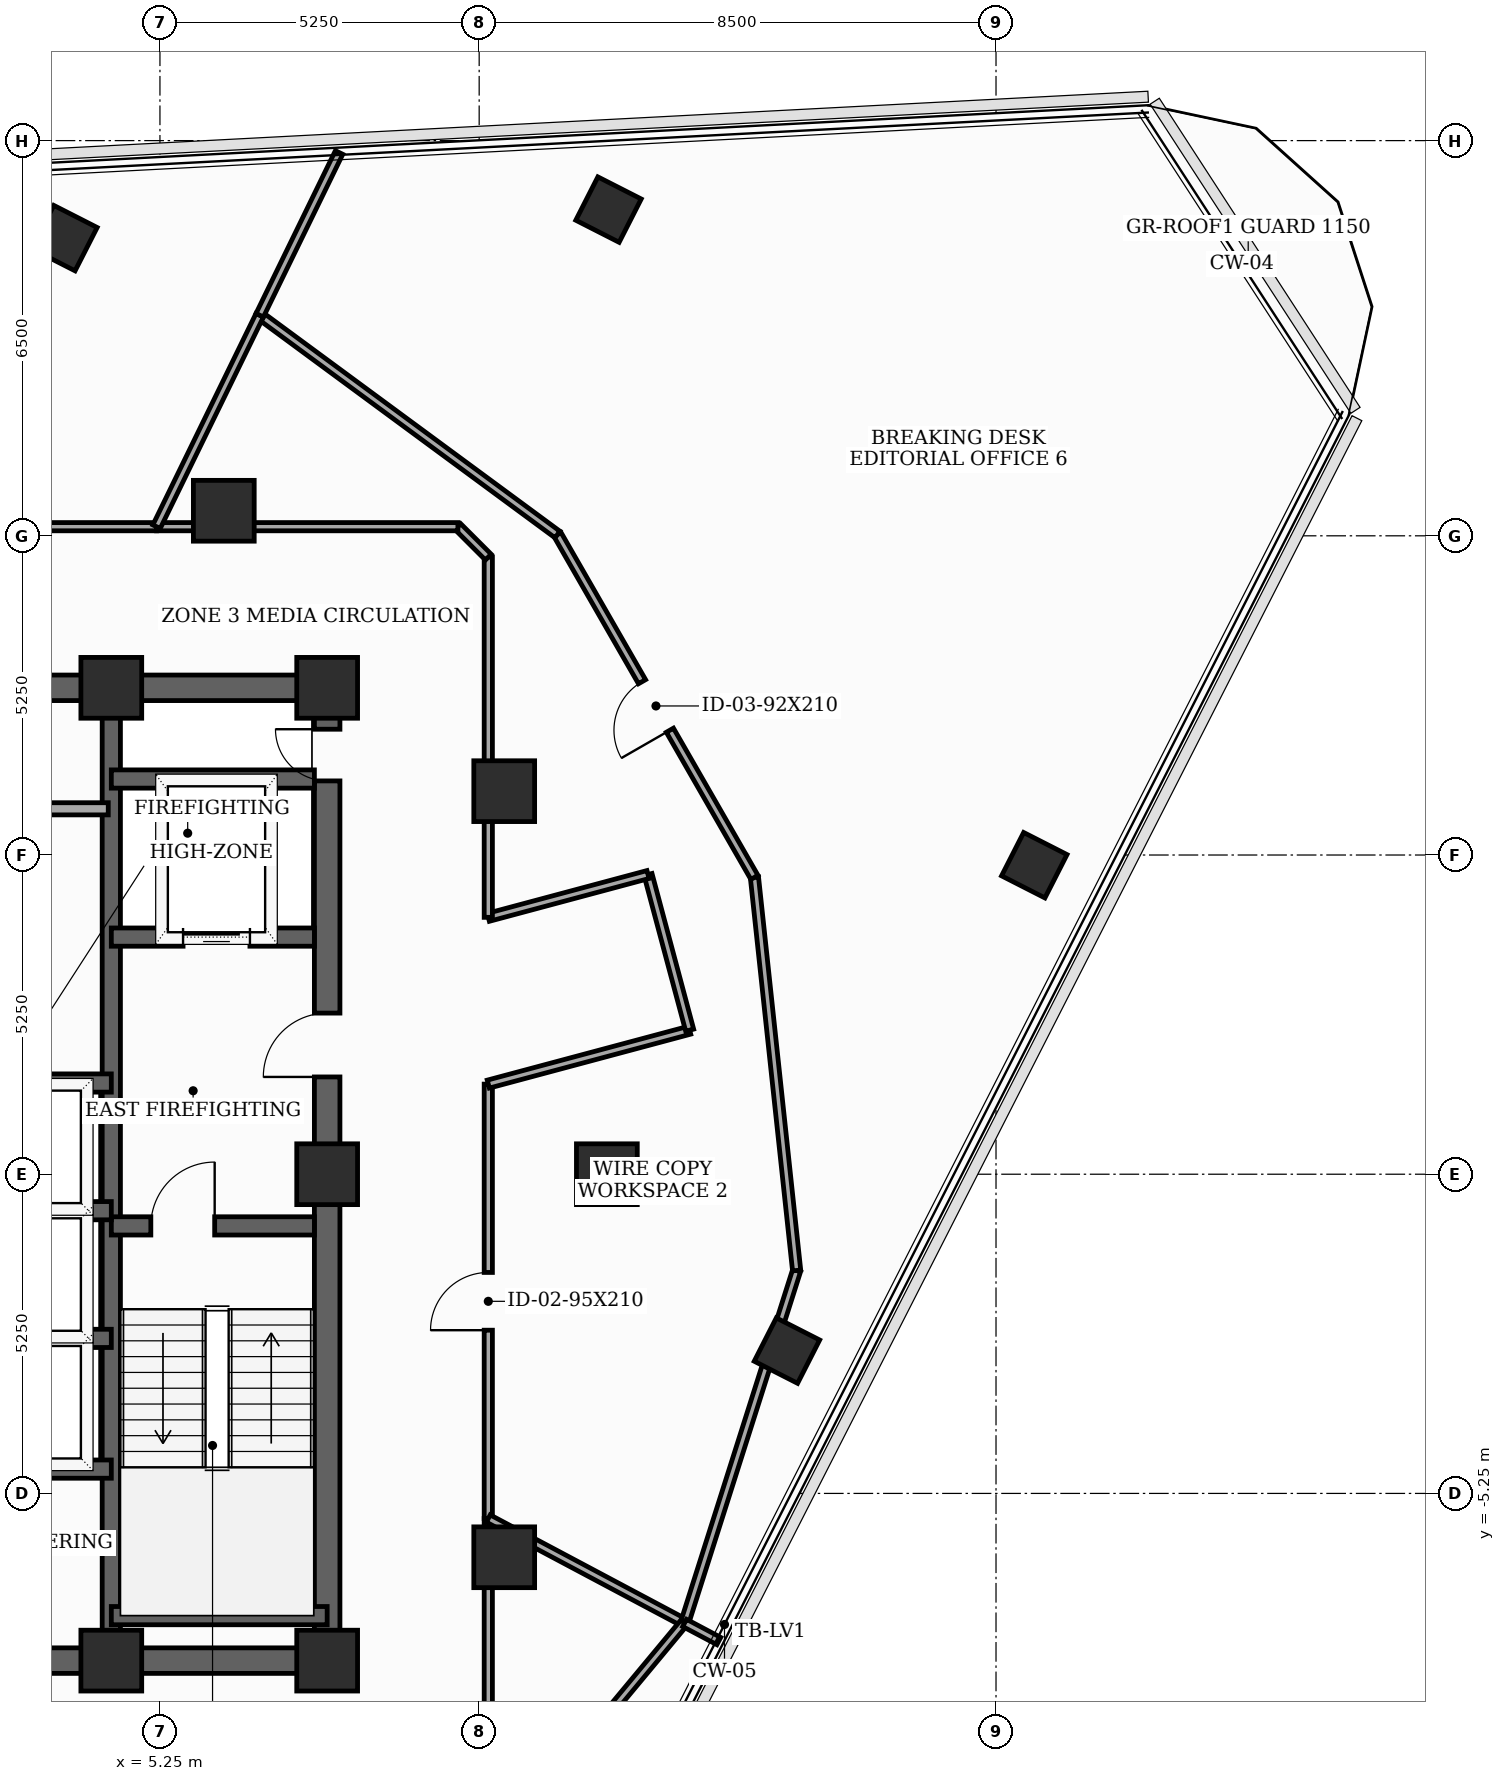
"""IFC4 building model, lengths in metres.
Left out: names, types, materials, properties, quantities, classifications, styles, units other than length and angle.
Written with IfcOpenShell. Run it as: python <this file> out.ifc"""

import sys

from ifc_helpers import new_model, si_unit, direction, frame, frame_2d, origin, origin_2d, place, context, subcontext, project, spatial, rectangle, extrude, element, fill, save


model = new_model("IFC4")
c1 = context("Model", 3, precision=1e-05, world=origin(), true_north=direction((0.0, 1.0)))
c2 = subcontext(c1, "Body", "Model", "MODEL_VIEW")
j1 = project(units=[si_unit("LENGTHUNIT", "METRE"), si_unit("PLANEANGLEUNIT", "RADIAN")], contexts=[c1])
p1 = place(None, origin())
s1 = spatial("IfcSite", under=j1, at=p1, CompositionType="ELEMENT")
p2 = place(p1, origin())
s2 = spatial("IfcBuilding", under=s1, at=p2, CompositionType="ELEMENT")
p3 = place(p2, frame((0.0, 0.0, 263.3)))
s3 = spatial("IfcBuildingStorey", under=s2, at=p3, CompositionType="ELEMENT", Elevation=263.3)
for number, where, z_axis, x_axis in (
    (1, (4.45, -8.0, 0.0), (0.0, 0.0, 1.0), (1.0, 0.0, 0.0)),
    (2, (8.0, -8.0, 0.0), (0.0, 0.0, 1.0), (1.0, 0.0, 0.0)),
    (3, (8.0, 0.0, 0.0), (0.0, 0.0, 1.0), (1.0, 0.0, 0.0)),
    (4, (8.0, 8.0, 0.0), (0.0, 0.0, 1.0), (1.0, 0.0, 0.0)),
    (5, (4.45, 8.0, 0.0), (0.0, 0.0, 1.0), (1.0, 0.0, 0.0)),
    (6, (12.6, 0.0, 0.0), (0.0, 0.0, 1.0), (1.0, 0.0, 0.0)),
    (7, (10.912, 6.3, 0.0), (0.0, 0.0, 1.0), (1.0, 0.0, 0.0)),
    (8, (6.3, 10.912, 0.0), (0.0, 0.0, 1.0), (1.0, 0.0, 0.0)),
    (9, (10.912, -6.3, 0.0), (0.0, 0.0, 1.0), (1.0, 0.0, 0.0)),
):
    element("IfcColumn", number, at=place(p3, frame(where, z_axis=z_axis, x_axis=x_axis)), inside=s3, PredefinedType="COLUMN", context=c2, shape_type="SweptSolid", body=[
        extrude(rectangle(XDim=1.0, YDim=1.0, at=origin_2d()), origin(), (0.0, 0.0, 1.0), 3.7),
    ])
for number, where, z_axis, x_axis in (
    (10, (15.562, -2.901, 0.0), (0.0, 0.0, 1.0), (0.454, 0.891, 0.0)),
    (11, (19.629, 5.082, 0.0), (0.0, 0.0, 1.0), (0.454, 0.891, 0.0)),
    (12, (12.627, 15.865, 0.0), (0.0, 0.0, 1.0), (0.454, 0.891, 0.0)),
    (13, (3.679, 15.396, 0.0), (0.0, 0.0, 1.0), (0.454, 0.891, 0.0)),
):
    element("IfcColumn", number, at=place(p3, frame(where, z_axis=z_axis, x_axis=x_axis)), inside=s3, PredefinedType="COLUMN", context=c2, shape_type="SweptSolid", body=[
        extrude(rectangle(XDim=0.8, YDim=0.8, at=origin_2d()), origin(), (0.0, 0.0, 1.0), 3.7),
    ])
p4 = place(p3, frame((8.0, -8.0, 0.0), z_axis=(0.0, 0.0, 1.0), x_axis=(0.0, 1.0, 0.0)))
e14 = element("IfcWall", 14, at=p4, inside=s3, PredefinedType="SHEAR", context=c2, shape_type="SweptSolid", body=[
    extrude(rectangle(XDim=16.0, YDim=0.42, at=frame_2d((8.0, 0.0))), origin(), (0.0, 0.0, 1.0), 3.5),
])
p5 = place(p4, frame((9.6, 0.0, 0.0)))
e15 = element("IfcOpeningElement", 15, at=p5, cuts=e14, PredefinedType="OPENING", context=c2, shape_type="SweptSolid", body=[
    extrude(rectangle(XDim=1.05, YDim=2.15, at=frame_2d((0.525, 1.075))), frame((0.0, 0.22, 0.0), z_axis=(0.0, -1.0, 0.0), x_axis=(1.0, 0.0, 0.0)), (0.0, 0.0, 1.0), 0.44),
])
p6 = place(p4, frame((14.469, 0.0, 0.0)))
e16 = element("IfcOpeningElement", 16, at=p6, cuts=e14, PredefinedType="OPENING", context=c2, shape_type="SweptSolid", body=[
    extrude(rectangle(XDim=0.85, YDim=2.02, at=frame_2d((0.425, 1.01))), frame((0.0, 0.22, 0.0), z_axis=(0.0, -1.0, 0.0), x_axis=(1.0, 0.0, 0.0)), (0.0, 0.0, 1.0), 0.44),
])
p7 = place(p3, frame((-8.0, -8.0, 0.0), z_axis=(0.0, 0.0, 1.0), x_axis=(1.0, 0.0, 0.0)))
e17 = element("IfcWall", 17, at=p7, inside=s3, PredefinedType="SHEAR", context=c2, shape_type="SweptSolid", body=[
    extrude(rectangle(XDim=16.0, YDim=0.42, at=frame_2d((8.0, 0.0))), origin(), (0.0, 0.0, 1.0), 3.5),
])
p8 = place(p7, frame((4.6, 0.0, 0.0)))
e18 = element("IfcOpeningElement", 18, at=p8, cuts=e17, PredefinedType="OPENING", context=c2, shape_type="SweptSolid", body=[
    extrude(rectangle(XDim=0.95, YDim=2.1, at=frame_2d((0.475, 1.05))), frame((0.0, 0.22, 0.0), z_axis=(0.0, -1.0, 0.0), x_axis=(1.0, 0.0, 0.0)), (0.0, 0.0, 1.0), 0.44),
])
p9 = place(p7, frame((7.52, 0.0, 0.0)))
e19 = element("IfcOpeningElement", 19, at=p9, cuts=e17, PredefinedType="OPENING", context=c2, shape_type="SweptSolid", body=[
    extrude(rectangle(XDim=0.95, YDim=2.1, at=frame_2d((0.475, 1.05))), frame((0.0, 0.22, 0.0), z_axis=(0.0, -1.0, 0.0), x_axis=(1.0, 0.0, 0.0)), (0.0, 0.0, 1.0), 0.44),
])
p10 = place(p7, frame((10.45, 0.0, 0.0)))
e20 = element("IfcOpeningElement", 20, at=p10, cuts=e17, PredefinedType="OPENING", context=c2, shape_type="SweptSolid", body=[
    extrude(rectangle(XDim=0.95, YDim=2.1, at=frame_2d((0.475, 1.05))), frame((0.0, 0.22, 0.0), z_axis=(0.0, -1.0, 0.0), x_axis=(1.0, 0.0, 0.0)), (0.0, 0.0, 1.0), 0.44),
])
p11 = place(p3, frame((-8.0, 8.0, 0.0), z_axis=(0.0, 0.0, 1.0), x_axis=(1.0, 0.0, 0.0)))
e21 = element("IfcWall", 21, at=p11, inside=s3, PredefinedType="SHEAR", context=c2, shape_type="SweptSolid", body=[
    extrude(rectangle(XDim=16.0, YDim=0.42, at=frame_2d((8.0, 0.0))), origin(), (0.0, 0.0, 1.0), 3.5),
])
p12 = place(p11, frame((7.1, 0.0, 0.0)))
e22 = element("IfcOpeningElement", 22, at=p12, cuts=e21, PredefinedType="OPENING", context=c2, shape_type="SweptSolid", body=[
    extrude(rectangle(XDim=1.8, YDim=2.15, at=frame_2d((0.9, 1.075))), frame((0.0, 0.22, 0.0), z_axis=(0.0, -1.0, 0.0), x_axis=(1.0, 0.0, 0.0)), (0.0, 0.0, 1.0), 0.44),
])
p13 = place(p3, frame((4.45, -7.79, 0.0), z_axis=(0.0, 0.0, 1.0), x_axis=(0.0, 1.0, 0.0)))
e23 = element("IfcWall", 23, at=p13, inside=s3, PredefinedType="SHEAR", context=c2, shape_type="SweptSolid", body=[
    extrude(rectangle(XDim=15.58, YDim=0.3, at=frame_2d((7.79, 0.0))), origin(), (0.0, 0.0, 1.0), 3.5),
])
p14 = place(p3, frame((4.45, -0.85, 0.0), z_axis=(0.0, 0.0, 1.0), x_axis=(1.0, 0.0, 0.0)))
e24 = element("IfcWall", 24, at=p14, inside=s3, PredefinedType="SHEAR", context=c2, shape_type="SweptSolid", body=[
    extrude(rectangle(XDim=3.34, YDim=0.3, at=frame_2d((1.67, 0.0))), origin(), (0.0, 0.0, 1.0), 3.5),
])
p15 = place(p14, frame((0.65, 0.0, 0.0)))
e25 = element("IfcOpeningElement", 25, at=p15, cuts=e24, PredefinedType="OPENING", context=c2, shape_type="SweptSolid", body=[
    extrude(rectangle(XDim=1.05, YDim=2.15, at=frame_2d((0.525, 1.075))), frame((0.0, 0.16, 0.0), z_axis=(0.0, -1.0, 0.0), x_axis=(1.0, 0.0, 0.0)), (0.0, 0.0, 1.0), 0.32),
])
p16 = place(p3, frame((4.45, -7.26, 0.0), z_axis=(0.0, 0.0, 1.0), x_axis=(1.0, 0.0, 0.0)))
e26 = element("IfcWall", 26, at=p16, inside=s3, PredefinedType="SHEAR", context=c2, shape_type="SweptSolid", body=[
    extrude(rectangle(XDim=3.55, YDim=0.3, at=frame_2d((1.775, 0.0))), origin(), (0.0, 0.0, 1.0), 3.5),
])
p17 = place(p3, frame((4.45, 3.9, 0.0), z_axis=(0.0, 0.0, 1.0), x_axis=(1.0, 0.0, 0.0)))
e27 = element("IfcWall", 27, at=p17, inside=s3, PredefinedType="SHEAR", context=c2, shape_type="SweptSolid", body=[
    extrude(rectangle(XDim=3.34, YDim=0.3, at=frame_2d((1.67, 0.0))), origin(), (0.0, 0.0, 1.0), 3.5),
])
p18 = place(p17, frame((1.18, 0.0, 0.0)))
e28 = element("IfcOpeningElement", 28, at=p18, cuts=e27, PredefinedType="OPENING", context=c2, shape_type="SweptSolid", body=[
    extrude(rectangle(XDim=1.1, YDim=2.1, at=frame_2d((0.55, 1.05))), frame((0.0, 0.16, 0.0), z_axis=(0.0, -1.0, 0.0), x_axis=(1.0, 0.0, 0.0)), (0.0, 0.0, 1.0), 0.32),
])
p19 = place(p3, frame((4.45, 6.5, 0.0), z_axis=(0.0, 0.0, 1.0), x_axis=(1.0, 0.0, 0.0)))
e29 = element("IfcWall", 29, at=p19, inside=s3, PredefinedType="SHEAR", context=c2, shape_type="SweptSolid", body=[
    extrude(rectangle(XDim=3.34, YDim=0.3, at=frame_2d((1.67, 0.0))), origin(), (0.0, 0.0, 1.0), 3.5),
])
p20 = place(p3, frame((-4.45, -4.85, 0.0), z_axis=(0.0, 0.0, 1.0), x_axis=(1.0, 0.0, 0.0)))
e30 = element("IfcWall", 30, at=p20, inside=s3, PredefinedType="SHEAR", context=c2, shape_type="SweptSolid", body=[
    extrude(rectangle(XDim=8.9, YDim=0.3, at=frame_2d((4.45, 0.0))), origin(), (0.0, 0.0, 1.0), 3.5),
])
for number, where, z_axis, x_axis in (
    (31, (1.68, 1.5, 0.0), (0.0, 0.0, 1.0), (1.0, 0.0, 0.0)),
    (32, (1.68, -2.7, 0.0), (0.0, 0.0, 1.0), (1.0, 0.0, 0.0)),
    (33, (1.68, -0.6, 0.0), (0.0, 0.0, 1.0), (1.0, 0.0, 0.0)),
):
    element("IfcWall", number, at=place(p3, frame(where, z_axis=z_axis, x_axis=x_axis)), inside=s3, PredefinedType="SHEAR", context=c2, shape_type="SweptSolid", body=[
        extrude(rectangle(XDim=2.77, YDim=0.3, at=frame_2d((1.385, 0.0))), origin(), (0.0, 0.0, 1.0), 3.5),
    ])
p21 = place(p3, frame((1.72, 6.01, 0.0), z_axis=(0.0, 0.0, 1.0), x_axis=(1.0, 0.0, 0.0)))
e34 = element("IfcWall", 34, at=p21, inside=s3, PredefinedType="SOLIDWALL", context=c2, shape_type="SweptSolid", body=[
    extrude(rectangle(XDim=2.68, YDim=0.2, at=frame_2d((1.34, 0.0))), origin(), (0.0, 0.0, 1.0), 3.5),
])
p22 = place(p3, frame((10.65, -5.663, 0.0), z_axis=(0.0, 0.0, 1.0), x_axis=(0.0, 1.0, 0.0)))
e35 = element("IfcWall", 35, at=p22, inside=s3, PredefinedType="PARTITIONING", context=c2, shape_type="SweptSolid", body=[
    extrude(rectangle(XDim=7.145, YDim=0.135, at=frame_2d((3.573, 0.0))), origin(), (0.0, 0.0, 1.0), 2.885),
])
p23 = place(p22, frame((3.097, 0.0, 0.0)))
e36 = element("IfcOpeningElement", 36, at=p23, cuts=e35, PredefinedType="OPENING", context=c2, shape_type="SweptSolid", body=[
    extrude(rectangle(XDim=0.95, YDim=2.1, at=frame_2d((0.475, 1.05))), frame((0.0, 0.077, 0.0), z_axis=(0.0, -1.0, 0.0), x_axis=(1.0, 0.0, 0.0)), (0.0, 0.0, 1.0), 0.155),
])
p24 = place(p3, frame((10.65, 1.482, 0.0), z_axis=(0.0, 0.0, 1.0), x_axis=(0.965961397105, 0.2586862565, 0.0)))
e37 = element("IfcWall", 37, at=p24, inside=s3, PredefinedType="PARTITIONING", context=c2, shape_type="SweptSolid", body=[
    extrude(rectangle(XDim=3.429, YDim=0.135, at=frame_2d((1.714, 0.0))), origin(), (0.0, 0.0, 1.0), 2.885),
])
p25 = place(p3, frame((13.962, 2.369, 0.0), z_axis=(0.0, 0.0, 1.0), x_axis=(-0.258413725385, 0.966034340245, 0.0)))
e38 = element("IfcWall", 38, at=p25, inside=s3, PredefinedType="PARTITIONING", context=c2, shape_type="SweptSolid", body=[
    extrude(rectangle(XDim=2.65, YDim=0.135, at=frame_2d((1.325, 0.0))), origin(), (0.0, 0.0, 1.0), 3.5),
])
p26 = place(p3, frame((13.277, 4.929, 0.0), z_axis=(0.0, 0.0, 1.0), x_axis=(-0.965934830229, -0.258785439601, 0.0)))
e39 = element("IfcWall", 39, at=p26, inside=s3, PredefinedType="PARTITIONING", context=c2, shape_type="SweptSolid", body=[
    extrude(rectangle(XDim=2.72, YDim=0.135, at=frame_2d((1.36, 0.0))), origin(), (0.0, 0.0, 1.0), 2.885),
])
p27 = place(p3, frame((10.65, 4.225, 0.0), z_axis=(0.0, 0.0, 1.0), x_axis=(0.0, 1.0, 0.0)))
e40 = element("IfcWall", 40, at=p27, inside=s3, PredefinedType="PARTITIONING", context=c2, shape_type="SweptSolid", body=[
    extrude(rectangle(XDim=5.925, YDim=0.135, at=frame_2d((2.962, 0.0))), origin(), (0.0, 0.0, 1.0), 2.885),
])
p28 = place(p3, frame((10.65, 10.15, 0.0), z_axis=(0.0, 0.0, 1.0), x_axis=(-0.707106781187, 0.707106781187, 0.0)))
e41 = element("IfcWall", 41, at=p28, inside=s3, PredefinedType="PARTITIONING", context=c2, shape_type="SweptSolid", body=[
    extrude(rectangle(XDim=0.707, YDim=0.135, at=frame_2d((0.354, 0.0))), origin(), (0.0, 0.0, 1.0), 3.5),
])
p29 = place(p3, frame((10.15, 10.65, 0.0), z_axis=(0.0, 0.0, 1.0), x_axis=(-1.0, 0.0, 0.0)))
e42 = element("IfcWall", 42, at=p29, inside=s3, PredefinedType="PARTITIONING", context=c2, shape_type="SweptSolid", body=[
    extrude(rectangle(XDim=4.956, YDim=0.135, at=frame_2d((2.478, 0.0))), origin(), (0.0, 0.0, 1.0), 2.885),
])
p30 = place(p3, frame((10.65, -10.15, 0.0), z_axis=(0.0, 0.0, 1.0), x_axis=(0.0, 1.0, 0.0)))
e43 = element("IfcWall", 43, at=p30, inside=s3, PredefinedType="PARTITIONING", context=c2, shape_type="SweptSolid", body=[
    extrude(rectangle(XDim=4.487, YDim=0.135, at=frame_2d((2.243, 0.0))), origin(), (0.0, 0.0, 1.0), 2.885),
])
p31 = place(p3, frame((5.194, 10.65, 0.0), z_axis=(0.0, 0.0, 1.0), x_axis=(-1.0, 0.0, 0.0)))
e44 = element("IfcWall", 44, at=p31, inside=s3, PredefinedType="PARTITIONING", context=c2, shape_type="SweptSolid", body=[
    extrude(rectangle(XDim=6.344, YDim=0.135, at=frame_2d((3.172, 0.0))), origin(), (0.0, 0.0, 1.0), 2.885),
])
p32 = place(p31, frame((2.697, 0.0, 0.0)))
e45 = element("IfcOpeningElement", 45, at=p32, cuts=e44, PredefinedType="OPENING", context=c2, shape_type="SweptSolid", body=[
    extrude(rectangle(XDim=0.95, YDim=2.1, at=frame_2d((0.475, 1.05))), frame((0.0, 0.077, 0.0), z_axis=(0.0, -1.0, 0.0), x_axis=(1.0, 0.0, 0.0)), (0.0, 0.0, 1.0), 0.155),
])
p33 = place(p3, frame((10.65, -5.663, 0.0), z_axis=(0.0, 0.0, 1.0), x_axis=(0.882982204984, -0.469406461057, 0.0)))
e46 = element("IfcWall", 46, at=p33, inside=s3, PredefinedType="PARTITIONING", context=c2, shape_type="SweptSolid", body=[
    extrude(rectangle(XDim=3.647, YDim=0.135, at=frame_2d((1.823, 0.0))), origin(), (0.0, 0.0, 1.0), 2.885),
])
p34 = place(p3, frame((13.887, -7.354, 0.0), z_axis=(0.0, 0.0, 1.0), x_axis=(0.302867480059, 0.953032680197, 0.0)))
e47 = element("IfcWall", 47, at=p34, inside=s3, PredefinedType="PARTITIONING", context=c2, shape_type="SweptSolid", body=[
    extrude(rectangle(XDim=6.055, YDim=0.135, at=frame_2d((3.028, 0.0))), origin(), (0.0, 0.0, 1.0), 3.035),
])
p35 = place(p3, frame((15.721, -1.583, 0.0), z_axis=(0.0, 0.0, 1.0), x_axis=(-0.106709447524, 0.994290246261, 0.0)))
e48 = element("IfcWall", 48, at=p35, inside=s3, PredefinedType="PARTITIONING", context=c2, shape_type="SweptSolid", body=[
    extrude(rectangle(XDim=6.502, YDim=0.135, at=frame_2d((3.251, 0.0))), origin(), (0.0, 0.0, 1.0), 3.035),
])
p36 = place(p3, frame((15.027, 4.882, 0.0), z_axis=(0.0, 0.0, 1.0), x_axis=(-0.498082419026, 0.867129692639, 0.0)))
e49 = element("IfcWall", 49, at=p36, inside=s3, PredefinedType="PARTITIONING", context=c2, shape_type="SweptSolid", body=[
    extrude(rectangle(XDim=6.503, YDim=0.135, at=frame_2d((3.251, 0.0))), origin(), (0.0, 0.0, 1.0), 3.185),
])
p37 = place(p36, frame((2.792, 0.0, 0.0)))
e50 = element("IfcOpeningElement", 50, at=p37, cuts=e49, PredefinedType="OPENING", context=c2, shape_type="SweptSolid", body=[
    extrude(rectangle(XDim=0.92, YDim=2.1, at=frame_2d((0.46, 1.05))), frame((0.0, 0.077, 0.0), z_axis=(0.0, -1.0, 0.0), x_axis=(1.0, 0.0, 0.0)), (0.0, 0.0, 1.0), 0.155),
])
p38 = place(p3, frame((11.788, 10.521, 0.0), z_axis=(0.0, 0.0, 1.0), x_axis=(-0.805162772786, 0.593053883993, 0.0)))
e51 = element("IfcWall", 51, at=p38, inside=s3, PredefinedType="PARTITIONING", context=c2, shape_type="SweptSolid", body=[
    extrude(rectangle(XDim=6.082, YDim=0.135, at=frame_2d((3.041, 0.0))), origin(), (0.0, 0.0, 1.0), 3.035),
])
p39 = place(p3, frame((6.891, 14.128, 0.0), z_axis=(0.0, 0.0, 1.0), x_axis=(-0.438511877771, -0.898725393573, 0.0)))
e52 = element("IfcWall", 52, at=p39, inside=s3, PredefinedType="PARTITIONING", context=c2, shape_type="SweptSolid", body=[
    extrude(rectangle(XDim=3.87, YDim=0.135, at=frame_2d((1.935, 0.0))), origin(), (0.0, 0.0, 1.0), 2.885),
])
p40 = place(p3, frame((13.87, -7.375, 0.0), z_axis=(0.0, 0.0, 1.0), x_axis=(-0.63949044568, -0.768799043888, 0.0)))
e53 = element("IfcWall", 53, at=p40, inside=s3, PredefinedType="PARTITIONING", context=c2, shape_type="SweptSolid", body=[
    extrude(rectangle(XDim=6.82, YDim=0.135, at=frame_2d((3.41, 0.0))), origin(), (0.0, 0.0, 1.0), 3.035),
])
p41 = place(p3, frame((14.441, -7.678, 0.0), z_axis=(0.0, 0.0, 1.0), x_axis=(-0.883423592085, 0.468575241501, 0.0)))
e54 = element("IfcWall", 54, at=p41, inside=s3, PredefinedType="PARTITIONING", context=c2, shape_type="SweptSolid", body=[
    extrude(rectangle(XDim=0.636, YDim=0.135, at=frame_2d((0.318, 0.0))), origin(), (0.0, 0.0, 1.0), 3.5),
])
p42 = place(p3, frame((8.196, 16.805, 0.0), z_axis=(0.0, 0.0, 1.0), x_axis=(-0.438139314435, -0.898907081486, 0.0)))
e55 = element("IfcWall", 55, at=p42, inside=s3, PredefinedType="PARTITIONING", context=c2, shape_type="SweptSolid", body=[
    extrude(rectangle(XDim=2.978, YDim=0.135, at=frame_2d((1.489, 0.0))), origin(), (0.0, 0.0, 1.0), 3.035),
])
p43 = place(p5, origin())
e56 = element("IfcDoor", 56, at=p43, inside=s3, OperationType="SINGLE_SWING_LEFT", PredefinedType="DOOR", context=c2, shape_type="SweptSolid", body=[
    extrude(rectangle(XDim=1.05, YDim=2.15, at=frame_2d((0.525, 1.075))), frame((0.0, 0.025, 0.0), z_axis=(0.0, -1.0, 0.0), x_axis=(1.0, 0.0, 0.0)), (0.0, 0.0, 1.0), 0.05),
])
fill(e15, e56)
p44 = place(p6, origin())
e57 = element("IfcDoor", 57, at=p44, inside=s3, OperationType="SINGLE_SWING_RIGHT", PredefinedType="TRAPDOOR", context=c2, shape_type="SweptSolid", body=[
    extrude(rectangle(XDim=0.85, YDim=2.02, at=frame_2d((0.425, 1.01))), frame((0.0, 0.025, 0.0), z_axis=(0.0, -1.0, 0.0), x_axis=(1.0, 0.0, 0.0)), (0.0, 0.0, 1.0), 0.05),
])
fill(e16, e57)
p45 = place(p15, origin())
e58 = element("IfcDoor", 58, at=p45, inside=s3, OperationType="SINGLE_SWING_RIGHT", PredefinedType="DOOR", context=c2, shape_type="SweptSolid", body=[
    extrude(rectangle(XDim=1.05, YDim=2.15, at=frame_2d((0.525, 1.075))), frame((0.0, 0.025, 0.0), z_axis=(0.0, -1.0, 0.0), x_axis=(1.0, 0.0, 0.0)), (0.0, 0.0, 1.0), 0.05),
])
fill(e25, e58)
p46 = place(p18, origin())
e59 = element("IfcDoor", 59, at=p46, inside=s3, OperationType="SLIDING_TO_LEFT", PredefinedType="DOOR", context=c2, shape_type="SweptSolid", body=[
    extrude(rectangle(XDim=1.1, YDim=2.1, at=frame_2d((0.55, 1.05))), frame((0.0, 0.025, 0.0), z_axis=(0.0, -1.0, 0.0), x_axis=(1.0, 0.0, 0.0)), (0.0, 0.0, 1.0), 0.05),
])
fill(e28, e59)
p47 = place(p23, origin())
e60 = element("IfcDoor", 60, at=p47, inside=s3, OperationType="SINGLE_SWING_LEFT", PredefinedType="DOOR", context=c2, shape_type="SweptSolid", body=[
    extrude(rectangle(XDim=0.95, YDim=2.1, at=frame_2d((0.475, 1.05))), frame((0.0, 0.025, 0.0), z_axis=(0.0, -1.0, 0.0), x_axis=(1.0, 0.0, 0.0)), (0.0, 0.0, 1.0), 0.05),
])
fill(e36, e60)
p48 = place(p37, origin())
e61 = element("IfcDoor", 61, at=p48, inside=s3, OperationType="SINGLE_SWING_LEFT", PredefinedType="DOOR", context=c2, shape_type="SweptSolid", body=[
    extrude(rectangle(XDim=0.92, YDim=2.1, at=frame_2d((0.46, 1.05))), frame((0.0, 0.025, 0.0), z_axis=(0.0, -1.0, 0.0), x_axis=(1.0, 0.0, 0.0)), (0.0, 0.0, 1.0), 0.05),
])
fill(e50, e61)
save(model, sys.argv[1])
